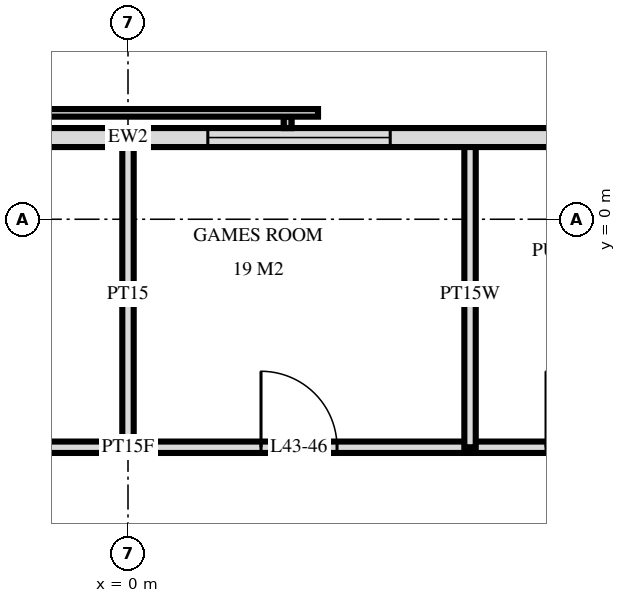
"""IFC4 building model, lengths in metres.
Left out: names, types, materials, properties, quantities, classifications, styles, units other than length and angle.
Written with IfcOpenShell. Run it as: python <this file> out.ifc"""

import sys

from ifc_helpers import new_model, si_unit, direction, frame, frame_2d, origin, place, context, subcontext, project, spatial, rectangle, extrude, element, fill, save


model = new_model("IFC4")
c1 = context("Model", 3, precision=1e-05, world=origin(), true_north=direction((0.0, 1.0)))
c2 = subcontext(c1, "Body", "Model", "MODEL_VIEW")
j1 = project(units=[si_unit("LENGTHUNIT", "METRE"), si_unit("PLANEANGLEUNIT", "RADIAN")], contexts=[c1])
p1 = place(None, origin())
s1 = spatial("IfcSite", under=j1, at=p1, CompositionType="ELEMENT")
p2 = place(p1, origin())
s2 = spatial("IfcBuilding", under=s1, at=p2, CompositionType="ELEMENT")
p3 = place(p2, frame((0.0, 0.0, 166.8)))
s3 = spatial("IfcBuildingStorey", under=s2, at=p3, CompositionType="ELEMENT", Elevation=166.8)
p4 = place(p3, frame((23.675, 1.075, 0.0), z_axis=(0.0, 0.0, 1.0), x_axis=(-1.0, 0.0, 0.0)))
e1 = element("IfcWall", 1, at=p4, inside=s3, PredefinedType="SOLIDWALL", context=c2, shape_type="SweptSolid", body=[
    extrude(rectangle(XDim=47.351, YDim=0.25, at=frame_2d((23.675, 0.0))), origin(), (0.0, 0.0, 1.0), 3.32),
])
p5 = place(p4, frame((20.225, 0.0, 0.3)))
e2 = element("IfcOpeningElement", 2, at=p5, cuts=e1, PredefinedType="OPENING", context=c2, shape_type="SweptSolid", body=[
    extrude(rectangle(XDim=2.4, YDim=2.1, at=frame_2d((1.2, 1.05))), frame((0.0, 0.135, 0.0), z_axis=(0.0, -1.0, 0.0), x_axis=(1.0, 0.0, 0.0)), (0.0, 0.0, 1.0), 0.27),
])
p6 = place(p4, frame((30.275, 0.0, 0.3)))
e3 = element("IfcOpeningElement", 3, at=p6, cuts=e1, PredefinedType="OPENING", context=c2, shape_type="SweptSolid", body=[
    extrude(rectangle(XDim=2.4, YDim=2.1, at=frame_2d((1.2, 1.05))), frame((0.0, 0.135, 0.0), z_axis=(0.0, -1.0, 0.0), x_axis=(1.0, 0.0, 0.0)), (0.0, 0.0, 1.0), 0.27),
])
p7 = place(p3, frame((4.5, -3.0, 0.0), z_axis=(0.0, 0.0, 1.0), x_axis=(0.0, 1.0, 0.0)))
e4 = element("IfcWall", 4, at=p7, inside=s3, PredefinedType="PLUMBINGWALL", context=c2, shape_type="SweptSolid", body=[
    extrude(rectangle(XDim=4.02, YDim=0.15, at=frame_2d((2.01, 0.0))), origin(), (0.0, 0.0, 1.0), 3.32),
])
p8 = place(p3, frame((0.0, -3.0, 0.0), z_axis=(0.0, 0.0, 1.0), x_axis=(0.0, 1.0, 0.0)))
e5 = element("IfcWall", 5, at=p8, inside=s3, PredefinedType="PARTITIONING", context=c2, shape_type="SweptSolid", body=[
    extrude(rectangle(XDim=4.02, YDim=0.15, at=frame_2d((2.01, 0.0))), origin(), (0.0, 0.0, 1.0), 3.32),
])
p9 = place(p3, frame((-9.95, -3.0, 0.0), z_axis=(0.0, 0.0, 1.0), x_axis=(1.0, 0.0, 0.0)))
e6 = element("IfcWall", 6, at=p9, inside=s3, PredefinedType="PARTITIONING", context=c2, shape_type="SweptSolid", body=[
    extrude(rectangle(XDim=19.9, YDim=0.15, at=frame_2d((9.95, 0.0))), origin(), (0.0, 0.0, 1.0), 3.32),
])
p10 = place(p9, frame((2.2, 0.0, 0.0)))
e7 = element("IfcOpeningElement", 7, at=p10, cuts=e6, PredefinedType="OPENING", context=c2, shape_type="SweptSolid", body=[
    extrude(rectangle(XDim=1.0, YDim=2.1, at=frame_2d((0.5, 1.05))), frame((0.0, 0.085, 0.0), z_axis=(0.0, -1.0, 0.0), x_axis=(1.0, 0.0, 0.0)), (0.0, 0.0, 1.0), 0.17),
])
p11 = place(p9, frame((7.2, 0.0, 0.0)))
e8 = element("IfcOpeningElement", 8, at=p11, cuts=e6, PredefinedType="OPENING", context=c2, shape_type="SweptSolid", body=[
    extrude(rectangle(XDim=1.0, YDim=2.1, at=frame_2d((0.5, 1.05))), frame((0.0, 0.085, 0.0), z_axis=(0.0, -1.0, 0.0), x_axis=(1.0, 0.0, 0.0)), (0.0, 0.0, 1.0), 0.17),
])
p12 = place(p9, frame((11.7, 0.0, 0.0)))
e9 = element("IfcOpeningElement", 9, at=p12, cuts=e6, PredefinedType="OPENING", context=c2, shape_type="SweptSolid", body=[
    extrude(rectangle(XDim=1.0, YDim=2.1, at=frame_2d((0.5, 1.05))), frame((0.0, 0.085, 0.0), z_axis=(0.0, -1.0, 0.0), x_axis=(1.0, 0.0, 0.0)), (0.0, 0.0, 1.0), 0.17),
])
p13 = place(p9, frame((15.45, 0.0, 0.0)))
e10 = element("IfcOpeningElement", 10, at=p13, cuts=e6, PredefinedType="OPENING", context=c2, shape_type="SweptSolid", body=[
    extrude(rectangle(XDim=1.0, YDim=2.1, at=frame_2d((0.5, 1.05))), frame((0.0, 0.085, 0.0), z_axis=(0.0, -1.0, 0.0), x_axis=(1.0, 0.0, 0.0)), (0.0, 0.0, 1.0), 0.17),
])
p14 = place(p9, frame((18.2, 0.0, 0.0)))
e11 = element("IfcOpeningElement", 11, at=p14, cuts=e6, PredefinedType="OPENING", context=c2, shape_type="SweptSolid", body=[
    extrude(rectangle(XDim=1.0, YDim=2.1, at=frame_2d((0.5, 1.05))), frame((0.0, 0.085, 0.0), z_axis=(0.0, -1.0, 0.0), x_axis=(1.0, 0.0, 0.0)), (0.0, 0.0, 1.0), 0.17),
])
p15 = place(p5, origin())
e12 = element("IfcWindow", 12, at=p15, inside=s3, PartitioningType="SINGLE_PANEL", PredefinedType="WINDOW", context=c2, shape_type="SweptSolid", body=[
    extrude(rectangle(XDim=2.4, YDim=2.1, at=frame_2d((1.2, 1.05))), frame((0.0, 0.03, 0.0), z_axis=(0.0, -1.0, 0.0), x_axis=(1.0, 0.0, 0.0)), (0.0, 0.0, 1.0), 0.06),
])
fill(e2, e12)
p16 = place(p12, origin())
e13 = element("IfcDoor", 13, at=p16, inside=s3, OperationType="SINGLE_SWING_RIGHT", PredefinedType="DOOR", context=c2, shape_type="SweptSolid", body=[
    extrude(rectangle(XDim=1.0, YDim=2.1, at=frame_2d((0.5, 1.05))), frame((0.0, 0.025, 0.0), z_axis=(0.0, -1.0, 0.0), x_axis=(1.0, 0.0, 0.0)), (0.0, 0.0, 1.0), 0.05),
])
fill(e9, e13)
save(model, sys.argv[1])
